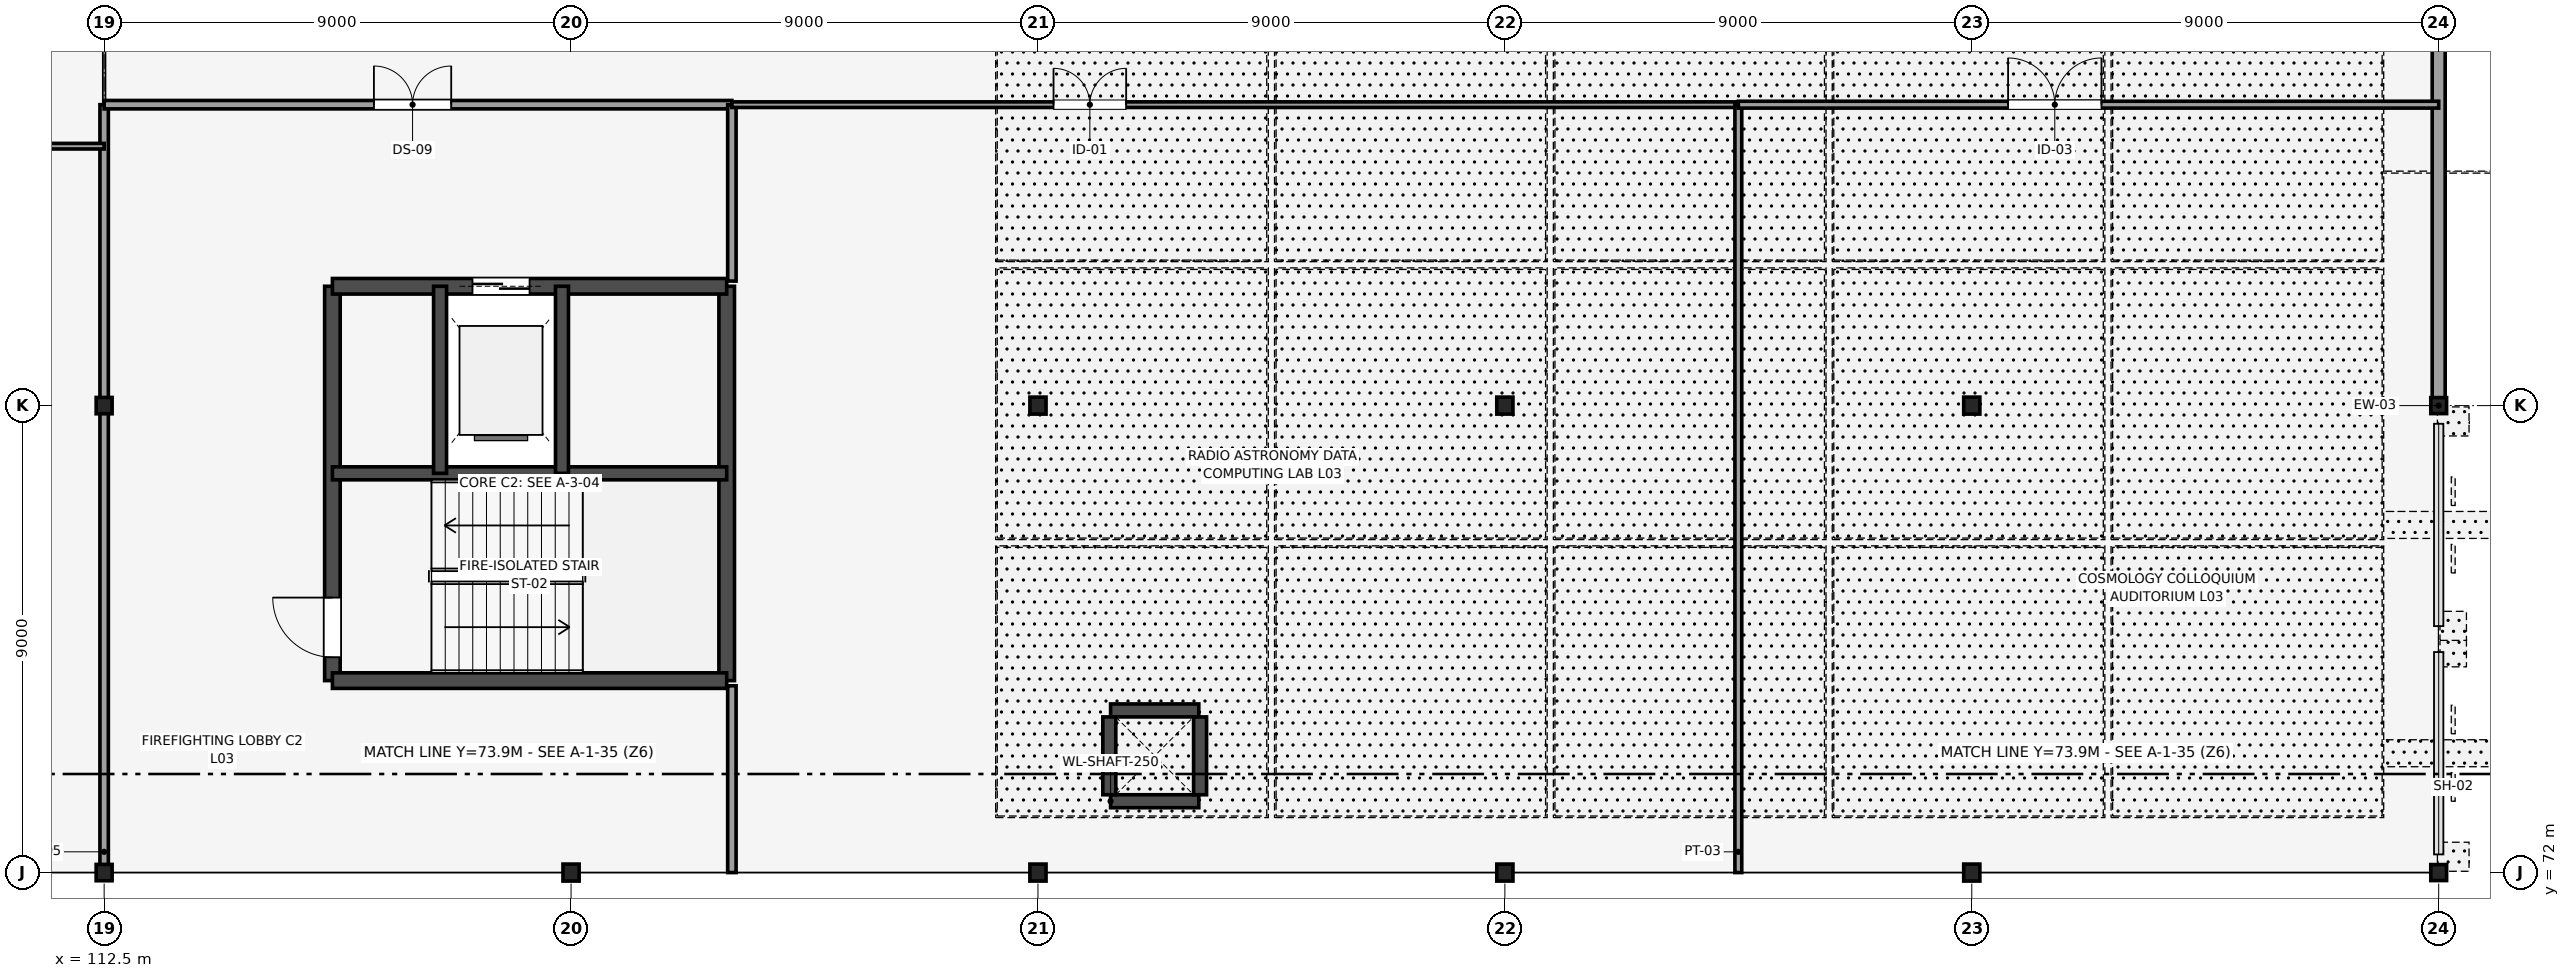
"""IFC4 building model, lengths in metres.
Left out: names, types, materials, properties, quantities, classifications, styles, units other than length and angle.
Written with IfcOpenShell. Run it as: python <this file> out.ifc"""

import sys

from ifc_helpers import new_model, si_unit, direction, frame, frame_2d, origin, origin_2d, place, context, subcontext, project, spatial, rectangle, i_section, extrude, element, fill, save


model = new_model("IFC4")
c1 = context("Model", 3, precision=1e-05, world=origin(), true_north=direction((0.0, 1.0)))
c2 = subcontext(c1, "Body", "Model", "MODEL_VIEW")
j1 = project(units=[si_unit("LENGTHUNIT", "METRE"), si_unit("PLANEANGLEUNIT", "RADIAN")], contexts=[c1])
p1 = place(None, origin())
s1 = spatial("IfcSite", under=j1, at=p1, CompositionType="ELEMENT")
p2 = place(p1, origin())
s2 = spatial("IfcBuilding", under=s1, at=p2, CompositionType="ELEMENT")
p3 = place(p2, frame((0.0, 0.0, 14.4)))
s3 = spatial("IfcBuildingStorey", under=s2, at=p3, CompositionType="ELEMENT", Elevation=14.4)
for number, where, z_axis, x_axis in (
    (1, (112.5, 72.0, 0.0), (0.0, 0.0, 1.0), (1.0, 0.0, 0.0)),
    (2, (112.5, 81.0, 0.0), (0.0, 0.0, 1.0), (1.0, 0.0, 0.0)),
):
    element("IfcColumn", number, at=place(p3, frame(where, z_axis=z_axis, x_axis=x_axis)), inside=s3, PredefinedType="COLUMN", context=c2, shape_type="SweptSolid", body=[
        extrude(i_section(OverallWidth=0.307, OverallDepth=0.315, WebThickness=0.012, FlangeThickness=0.019, FilletRadius=0.017, at=origin_2d()), origin(), (0.0, 0.0, 1.0), 4.5),
    ])
for number, where, z_axis, x_axis in (
    (3, (121.5, 72.0, 0.0), (0.0, 0.0, 1.0), (1.0, 0.0, 0.0)),
    (4, (130.5, 72.0, 0.0), (0.0, 0.0, 1.0), (1.0, 0.0, 0.0)),
    (5, (130.5, 81.0, 0.0), (0.0, 0.0, 1.0), (1.0, 0.0, 0.0)),
    (6, (139.5, 72.0, 0.0), (0.0, 0.0, 1.0), (1.0, 0.0, 0.0)),
    (7, (139.5, 81.0, 0.0), (0.0, 0.0, 1.0), (1.0, 0.0, 0.0)),
    (8, (148.5, 72.0, 0.0), (0.0, 0.0, 1.0), (1.0, 0.0, 0.0)),
    (9, (148.5, 81.0, 0.0), (0.0, 0.0, 1.0), (1.0, 0.0, 0.0)),
):
    element("IfcColumn", number, at=place(p3, frame(where, z_axis=z_axis, x_axis=x_axis)), inside=s3, PredefinedType="COLUMN", context=c2, shape_type="SweptSolid", body=[
        extrude(i_section(OverallWidth=0.311, OverallDepth=0.327, WebThickness=0.016, FlangeThickness=0.025, FilletRadius=0.017, at=origin_2d()), origin(), (0.0, 0.0, 1.0), 4.5),
    ])
for number, where, z_axis, x_axis in (
    (10, (157.5, 72.0, 0.0), (0.0, 0.0, 1.0), (1.0, 0.0, 0.0)),
    (11, (157.5, 81.0, 0.0), (0.0, 0.0, 1.0), (1.0, 0.0, 0.0)),
):
    element("IfcColumn", number, at=place(p3, frame(where, z_axis=z_axis, x_axis=x_axis)), inside=s3, PredefinedType="COLUMN", context=c2, shape_type="SweptSolid", body=[
        extrude(i_section(OverallWidth=0.305, OverallDepth=0.308, WebThickness=0.01, FlangeThickness=0.015, FilletRadius=0.017, at=origin_2d()), origin(), (0.0, 0.0, 1.0), 4.5),
    ])
p4 = place(p3, frame((116.9, 75.7, 0.0), z_axis=(0.0, 0.0, 1.0), x_axis=(0.0, 1.0, 0.0)))
e12 = element("IfcWall", 12, at=p4, inside=s3, PredefinedType="SHEAR", context=c2, shape_type="SweptSolid", body=[
    extrude(rectangle(XDim=7.6, YDim=0.3, at=frame_2d((3.8, 0.0))), origin(), (0.0, 0.0, 1.0), 4.5),
])
p5 = place(p4, frame((0.45, 0.0, 0.0)))
e13 = element("IfcOpeningElement", 13, at=p5, cuts=e12, PredefinedType="OPENING", context=c2, shape_type="SweptSolid", body=[
    extrude(rectangle(XDim=1.15, YDim=2.15, at=frame_2d((0.575, 1.075))), frame((0.0, 0.16, 0.0), z_axis=(0.0, -1.0, 0.0), x_axis=(1.0, 0.0, 0.0)), (0.0, 0.0, 1.0), 0.32),
])
for number, where, z_axis, x_axis in (
    (14, (124.5, 75.7, 0.0), (0.0, 0.0, 1.0), (0.0, 1.0, 0.0)),
    (15, (116.9, 75.7, 0.0), (0.0, 0.0, 1.0), (1.0, 0.0, 0.0)),
):
    element("IfcWall", number, at=place(p3, frame(where, z_axis=z_axis, x_axis=x_axis)), inside=s3, PredefinedType="SHEAR", context=c2, shape_type="SweptSolid", body=[
        extrude(rectangle(XDim=7.6, YDim=0.3, at=frame_2d((3.8, 0.0))), origin(), (0.0, 0.0, 1.0), 4.5),
    ])
p6 = place(p3, frame((116.9, 83.3, 0.0), z_axis=(0.0, 0.0, 1.0), x_axis=(1.0, 0.0, 0.0)))
e16 = element("IfcWall", 16, at=p6, inside=s3, PredefinedType="SHEAR", context=c2, shape_type="SweptSolid", body=[
    extrude(rectangle(XDim=7.6, YDim=0.3, at=frame_2d((3.8, 0.0))), origin(), (0.0, 0.0, 1.0), 4.5),
])
p7 = place(p6, frame((2.7, 0.0, 0.0)))
e17 = element("IfcOpeningElement", 17, at=p7, cuts=e16, PredefinedType="OPENING", context=c2, shape_type="SweptSolid", body=[
    extrude(rectangle(XDim=1.1, YDim=2.2, at=frame_2d((0.55, 1.1))), frame((0.0, 0.16, 0.0), z_axis=(0.0, -1.0, 0.0), x_axis=(1.0, 0.0, 0.0)), (0.0, 0.0, 1.0), 0.32),
])
p8 = place(p3, frame((116.9, 79.695, 0.0), z_axis=(0.0, 0.0, 1.0), x_axis=(1.0, 0.0, 0.0)))
e18 = element("IfcWall", 18, at=p8, inside=s3, PredefinedType="SHEAR", context=c2, shape_type="SweptSolid", body=[
    extrude(rectangle(XDim=7.6, YDim=0.25, at=frame_2d((3.8, 0.0))), origin(), (0.0, 0.0, 1.0), 4.5),
])
for number, where, z_axis, x_axis in (
    (19, (118.975, 79.695, 0.0), (0.0, 0.0, 1.0), (0.0, 1.0, 0.0)),
    (20, (121.325, 79.695, 0.0), (0.0, 0.0, 1.0), (0.0, 1.0, 0.0)),
):
    element("IfcWall", number, at=place(p3, frame(where, z_axis=z_axis, x_axis=x_axis)), inside=s3, PredefinedType="SHEAR", context=c2, shape_type="SweptSolid", body=[
        extrude(rectangle(XDim=3.605, YDim=0.25, at=frame_2d((1.802, 0.0))), origin(), (0.0, 0.0, 1.0), 4.5),
    ])
for number, where, z_axis, x_axis in (
    (21, (131.9, 73.375, 0.0), (0.0, 0.0, 1.0), (1.0, 0.0, 0.0)),
    (22, (131.9, 75.125, 0.0), (0.0, 0.0, 1.0), (1.0, 0.0, 0.0)),
):
    element("IfcWall", number, at=place(p3, frame(where, z_axis=z_axis, x_axis=x_axis)), inside=s3, PredefinedType="SHEAR", context=c2, shape_type="SweptSolid", body=[
        extrude(rectangle(XDim=1.7, YDim=0.25, at=frame_2d((0.85, 0.0))), origin(), (0.0, 0.0, 1.0), 3.77),
    ])
for number, where, z_axis, x_axis in (
    (23, (131.875, 73.5, 0.0), (0.0, 0.0, 1.0), (0.0, 1.0, 0.0)),
    (24, (133.625, 73.5, 0.0), (0.0, 0.0, 1.0), (0.0, 1.0, 0.0)),
):
    element("IfcWall", number, at=place(p3, frame(where, z_axis=z_axis, x_axis=x_axis)), inside=s3, PredefinedType="SHEAR", context=c2, shape_type="SweptSolid", body=[
        extrude(rectangle(XDim=1.5, YDim=0.25, at=frame_2d((0.75, 0.0))), origin(), (0.0, 0.0, 1.0), 3.77),
    ])
p9 = place(p3, frame((108.0, 72.0, 0.0), z_axis=(0.0, 0.0, 1.0), x_axis=(1.0, 0.0, 0.0)))
e25 = element("IfcWall", 25, at=p9, inside=s3, PredefinedType="STANDARD", context=c2, shape_type="SweptSolid", body=[
    extrude(rectangle(XDim=4.5, YDim=0.25, at=frame_2d((2.25, 0.0))), origin(), (0.0, 0.0, 1.0), 3.846),
])
p10 = place(p3, frame((157.5, 81.0, 0.0), z_axis=(0.0, 0.0, 1.0), x_axis=(0.0, 1.0, 0.0)))
e26 = element("IfcWall", 26, at=p10, inside=s3, PredefinedType="STANDARD", context=c2, shape_type="SweptSolid", body=[
    extrude(rectangle(XDim=9.0, YDim=0.25, at=frame_2d((4.5, 0.0))), origin(), (0.0, 0.0, 1.0), 3.846),
])
p11 = place(p3, frame((69.0, 72.0, 4.5), z_axis=(0.0, 0.0, 1.0), x_axis=(1.0, 0.0, 0.0)))
e27 = element("IfcWall", 27, at=p11, inside=s3, PredefinedType="PARAPET", context=c2, shape_type="SweptSolid", body=[
    extrude(rectangle(XDim=43.5, YDim=0.185, at=frame_2d((21.75, 0.0))), origin(), (0.0, 0.0, 1.0), 1.0),
])
p12 = place(p3, frame((112.5, 72.0, 0.0), z_axis=(0.0, 0.0, 1.0), x_axis=(0.0, 1.0, 0.0)))
e28 = element("IfcWall", 28, at=p12, inside=s3, PredefinedType="PARTITIONING", context=c2, shape_type="SweptSolid", body=[
    extrude(rectangle(XDim=14.8, YDim=0.162, at=frame_2d((7.4, 0.0))), origin(), (0.0, 0.0, 1.0), 3.846),
])
p13 = place(p3, frame((112.5, 86.8, 0.0), z_axis=(0.0, 0.0, 1.0), x_axis=(1.0, 0.0, 0.0)))
e29 = element("IfcWall", 29, at=p13, inside=s3, PredefinedType="PARTITIONING", context=c2, shape_type="SweptSolid", body=[
    extrude(rectangle(XDim=12.1, YDim=0.162, at=frame_2d((6.05, 0.0))), origin(), (0.0, 0.0, 1.0), 4.32),
])
p14 = place(p13, frame((5.2, 0.0, 0.0)))
e30 = element("IfcOpeningElement", 30, at=p14, cuts=e29, PredefinedType="OPENING", context=c2, shape_type="SweptSolid", body=[
    extrude(rectangle(XDim=1.49, YDim=2.175, at=frame_2d((0.745, 1.087))), frame((0.0, 0.091, 0.0), z_axis=(0.0, -1.0, 0.0), x_axis=(1.0, 0.0, 0.0)), (0.0, 0.0, 1.0), 0.182),
])
p15 = place(p3, frame((124.6, 83.4, 0.0), z_axis=(0.0, 0.0, 1.0), x_axis=(0.0, 1.0, 0.0)))
e31 = element("IfcWall", 31, at=p15, inside=s3, PredefinedType="PARTITIONING", context=c2, shape_type="SweptSolid", body=[
    extrude(rectangle(XDim=3.4, YDim=0.162, at=frame_2d((1.7, 0.0))), origin(), (0.0, 0.0, 1.0), 4.32),
])
p16 = place(p3, frame((124.6, 72.0, 0.0), z_axis=(0.0, 0.0, 1.0), x_axis=(0.0, 1.0, 0.0)))
e32 = element("IfcWall", 32, at=p16, inside=s3, PredefinedType="PARTITIONING", context=c2, shape_type="SweptSolid", body=[
    extrude(rectangle(XDim=3.6, YDim=0.162, at=frame_2d((1.8, 0.0))), origin(), (0.0, 0.0, 1.0), 4.32),
])
p17 = place(p3, frame((90.0, 86.0, 0.0), z_axis=(0.0, 0.0, 1.0), x_axis=(1.0, 0.0, 0.0)))
e33 = element("IfcWall", 33, at=p17, inside=s3, PredefinedType="PARTITIONING", context=c2, shape_type="SweptSolid", body=[
    extrude(rectangle(XDim=22.5, YDim=0.108, at=frame_2d((11.25, 0.0))), origin(), (0.0, 0.0, 1.0), 4.32),
])
p18 = place(p17, frame((6.5, 0.0, 0.0)))
e34 = element("IfcOpeningElement", 34, at=p18, cuts=e33, PredefinedType="OPENING", context=c2, shape_type="SweptSolid", body=[
    extrude(rectangle(XDim=1.4, YDim=2.2, at=frame_2d((0.7, 1.1))), frame((0.0, 0.064, 0.0), z_axis=(0.0, -1.0, 0.0), x_axis=(1.0, 0.0, 0.0)), (0.0, 0.0, 1.0), 0.128),
])
p19 = place(p3, frame((124.6, 86.8, 0.0), z_axis=(0.0, 0.0, 1.0), x_axis=(1.0, 0.0, 0.0)))
e35 = element("IfcWall", 35, at=p19, inside=s3, PredefinedType="PARTITIONING", context=c2, shape_type="SweptSolid", body=[
    extrude(rectangle(XDim=19.4, YDim=0.108, at=frame_2d((9.7, 0.0))), origin(), (0.0, 0.0, 1.0), 4.32),
])
p20 = place(p19, frame((6.2, 0.0, 0.0)))
e36 = element("IfcOpeningElement", 36, at=p20, cuts=e35, PredefinedType="OPENING", context=c2, shape_type="SweptSolid", body=[
    extrude(rectangle(XDim=1.4, YDim=2.2, at=frame_2d((0.7, 1.1))), frame((0.0, 0.064, 0.0), z_axis=(0.0, -1.0, 0.0), x_axis=(1.0, 0.0, 0.0)), (0.0, 0.0, 1.0), 0.128),
])
p21 = place(p3, frame((144.0, 72.0, 0.0), z_axis=(0.0, 0.0, 1.0), x_axis=(0.0, 1.0, 0.0)))
e37 = element("IfcWall", 37, at=p21, inside=s3, PredefinedType="PARTITIONING", context=c2, shape_type="SweptSolid", body=[
    extrude(rectangle(XDim=14.8, YDim=0.132, at=frame_2d((7.4, 0.0))), origin(), (0.0, 0.0, 1.0), 4.32),
])
p22 = place(p3, frame((144.0, 86.8, 0.0), z_axis=(0.0, 0.0, 1.0), x_axis=(1.0, 0.0, 0.0)))
e38 = element("IfcWall", 38, at=p22, inside=s3, PredefinedType="PARTITIONING", context=c2, shape_type="SweptSolid", body=[
    extrude(rectangle(XDim=13.5, YDim=0.132, at=frame_2d((6.75, 0.0))), origin(), (0.0, 0.0, 1.0), 4.32),
])
p23 = place(p22, frame((5.2, 0.0, 0.0)))
e39 = element("IfcOpeningElement", 39, at=p23, cuts=e38, PredefinedType="OPENING", context=c2, shape_type="SweptSolid", body=[
    extrude(rectangle(XDim=1.8, YDim=2.3, at=frame_2d((0.9, 1.15))), frame((0.0, 0.076, 0.0), z_axis=(0.0, -1.0, 0.0), x_axis=(1.0, 0.0, 0.0)), (0.0, 0.0, 1.0), 0.152),
])
p24 = place(p5, origin())
e40 = element("IfcDoor", 40, at=p24, inside=s3, OperationType="SINGLE_SWING_RIGHT", PredefinedType="DOOR", context=c2, shape_type="SweptSolid", body=[
    extrude(rectangle(XDim=1.15, YDim=2.15, at=frame_2d((0.575, 1.075))), frame((0.0, 0.025, 0.0), z_axis=(0.0, -1.0, 0.0), x_axis=(1.0, 0.0, 0.0)), (0.0, 0.0, 1.0), 0.05),
])
fill(e13, e40)
p25 = place(p7, origin())
e41 = element("IfcDoor", 41, at=p25, inside=s3, OperationType="DOUBLE_DOOR_SLIDING", PredefinedType="DOOR", context=c2, shape_type="SweptSolid", body=[
    extrude(rectangle(XDim=1.1, YDim=2.2, at=frame_2d((0.55, 1.1))), frame((0.0, 0.025, 0.0), z_axis=(0.0, -1.0, 0.0), x_axis=(1.0, 0.0, 0.0)), (0.0, 0.0, 1.0), 0.05),
])
fill(e17, e41)
p26 = place(p14, origin())
e42 = element("IfcDoor", 42, at=p26, inside=s3, OperationType="DOUBLE_DOOR_SINGLE_SWING", PredefinedType="DOOR", context=c2, shape_type="SweptSolid", body=[
    extrude(rectangle(XDim=1.49, YDim=2.175, at=frame_2d((0.745, 1.087))), frame((0.0, 0.025, 0.0), z_axis=(0.0, -1.0, 0.0), x_axis=(1.0, 0.0, 0.0)), (0.0, 0.0, 1.0), 0.05),
])
fill(e30, e42)
p27 = place(p20, origin())
e43 = element("IfcDoor", 43, at=p27, inside=s3, OperationType="DOUBLE_DOOR_SINGLE_SWING", PredefinedType="DOOR", context=c2, shape_type="SweptSolid", body=[
    extrude(rectangle(XDim=1.4, YDim=2.2, at=frame_2d((0.7, 1.1))), frame((0.0, 0.025, 0.0), z_axis=(0.0, -1.0, 0.0), x_axis=(1.0, 0.0, 0.0)), (0.0, 0.0, 1.0), 0.05),
])
fill(e36, e43)
p28 = place(p23, origin())
e44 = element("IfcDoor", 44, at=p28, inside=s3, OperationType="DOUBLE_DOOR_SINGLE_SWING", PredefinedType="DOOR", context=c2, shape_type="SweptSolid", body=[
    extrude(rectangle(XDim=1.8, YDim=2.3, at=frame_2d((0.9, 1.15))), frame((0.0, 0.025, 0.0), z_axis=(0.0, -1.0, 0.0), x_axis=(1.0, 0.0, 0.0)), (0.0, 0.0, 1.0), 0.05),
])
fill(e39, e44)
save(model, sys.argv[1])
